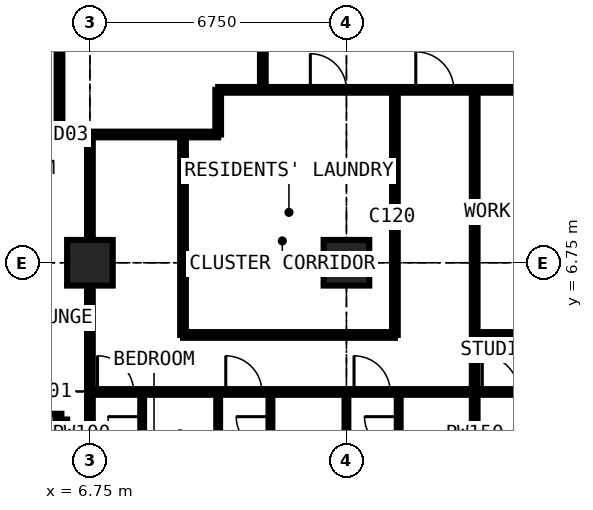
"""IFC4 building model, lengths in metres.
Left out: names, types, materials, properties, quantities, classifications, styles, units other than length and angle.
Written with IfcOpenShell. Run it as: python <this file> out.ifc"""

import sys

from ifc_helpers import new_model, si_unit, direction, frame, frame_2d, origin, origin_2d, place, context, subcontext, project, spatial, rectangle, extrude, element, fill, save


model = new_model("IFC4")
c1 = context("Model", 3, precision=1e-05, world=origin(), true_north=direction((0.0, 1.0)))
c2 = subcontext(c1, "Body", "Model", "MODEL_VIEW")
j1 = project(units=[si_unit("LENGTHUNIT", "METRE"), si_unit("PLANEANGLEUNIT", "RADIAN")], contexts=[c1])
p1 = place(None, origin())
s1 = spatial("IfcSite", under=j1, at=p1, CompositionType="ELEMENT")
p2 = place(p1, origin())
s2 = spatial("IfcBuilding", under=s1, at=p2, CompositionType="ELEMENT")
p3 = place(p2, frame((0.0, 0.0, 178.2)))
s3 = spatial("IfcBuildingStorey", under=s2, at=p3, CompositionType="ELEMENT", Elevation=178.2)
for number, where, z_axis, x_axis in (
    (1, (6.75, 6.75, 0.0), (0.0, 0.0, 1.0), (1.0, 0.0, 0.0)),
    (2, (13.5, 6.75, 0.0), (0.0, 0.0, 1.0), (1.0, 0.0, 0.0)),
):
    element("IfcColumn", number, at=place(p3, frame(where, z_axis=z_axis, x_axis=x_axis)), inside=s3, PredefinedType="COLUMN", context=c2, shape_type="SweptSolid", body=[
        extrude(rectangle(XDim=1.2, YDim=1.2, at=origin_2d()), origin(), (0.0, 0.0, 1.0), 3.6),
    ])
p4 = place(p3, frame((2.625, 2.625, 0.0), z_axis=(0.0, 0.0, 1.0), x_axis=(1.0, 0.0, 0.0)))
e3 = element("IfcWall", 3, at=p4, inside=s3, PredefinedType="SOLIDWALL", context=c2, shape_type="SweptSolid", body=[
    extrude(rectangle(XDim=3.375, YDim=0.3, at=frame_2d((1.688, 0.0))), origin(), (0.0, 0.0, 1.0), 3.375),
])
p5 = place(p4, frame((0.788, 0.0, 0.6)))
e4 = element("IfcOpeningElement", 4, at=p5, cuts=e3, PredefinedType="OPENING", context=c2, shape_type="SweptSolid", body=[
    extrude(rectangle(XDim=1.8, YDim=2.1, at=frame_2d((0.9, 1.05))), frame((0.0, 0.16, 0.0), z_axis=(0.0, -1.0, 0.0), x_axis=(1.0, 0.0, 0.0)), (0.0, 0.0, 1.0), 0.32),
])
p6 = place(p3, frame((6.0, 2.625, 0.0), z_axis=(0.0, 0.0, 1.0), x_axis=(0.0, -1.0, 0.0)))
e5 = element("IfcWall", 5, at=p6, inside=s3, PredefinedType="SOLIDWALL", context=c2, shape_type="SweptSolid", body=[
    extrude(rectangle(XDim=3.375, YDim=0.3, at=frame_2d((1.688, 0.0))), origin(), (0.0, 0.0, 1.0), 3.375),
])
p7 = place(p6, frame((0.788, 0.0, 0.6)))
e6 = element("IfcOpeningElement", 6, at=p7, cuts=e5, PredefinedType="OPENING", context=c2, shape_type="SweptSolid", body=[
    extrude(rectangle(XDim=1.8, YDim=2.1, at=frame_2d((0.9, 1.05))), frame((0.0, 0.16, 0.0), z_axis=(0.0, -1.0, 0.0), x_axis=(1.0, 0.0, 0.0)), (0.0, 0.0, 1.0), 0.32),
])
p8 = place(p3, frame((-0.734, 10.125, 0.0), z_axis=(0.0, 0.0, 1.0), x_axis=(1.0, 0.0, 0.0)))
e7 = element("IfcWall", 7, at=p8, inside=s3, PredefinedType="PARTITIONING", context=c2, shape_type="SweptSolid", body=[
    extrude(rectangle(XDim=10.859, YDim=0.15, at=frame_2d((5.429, 0.0))), origin(), (0.0, 0.0, 1.0), 3.375),
])
p9 = place(p8, frame((4.884, 0.0, 0.0)))
e8 = element("IfcOpeningElement", 8, at=p9, cuts=e7, PredefinedType="OPENING", context=c2, shape_type="SweptSolid", body=[
    extrude(rectangle(XDim=1.0, YDim=2.2, at=frame_2d((0.5, 1.1))), frame((0.0, 0.085, 0.0), z_axis=(0.0, -1.0, 0.0), x_axis=(1.0, 0.0, 0.0)), (0.0, 0.0, 1.0), 0.17),
])
p10 = place(p3, frame((5.95, 10.125, 0.0), z_axis=(0.0, 0.0, 1.0), x_axis=(0.0, 1.0, 0.0)))
e9 = element("IfcWall", 9, at=p10, inside=s3, PredefinedType="PARTITIONING", context=c2, shape_type="SweptSolid", body=[
    extrude(rectangle(XDim=2.65, YDim=0.15, at=frame_2d((1.325, 0.0))), origin(), (0.0, 0.0, 1.0), 3.375),
])
p11 = place(p3, frame((6.75, -0.734, 0.0), z_axis=(0.0, 0.0, 1.0), x_axis=(0.0, 1.0, 0.0)))
e10 = element("IfcWall", 10, at=p11, inside=s3, PredefinedType="PARTITIONING", context=c2, shape_type="SweptSolid", body=[
    extrude(rectangle(XDim=10.859, YDim=0.15, at=frame_2d((5.429, 0.0))), origin(), (0.0, 0.0, 1.0), 2.877),
])
p12 = place(p3, frame((6.75, 3.35, 0.0), z_axis=(0.0, 0.0, 1.0), x_axis=(1.0, 0.0, 0.0)))
e11 = element("IfcWall", 11, at=p12, inside=s3, PredefinedType="PARTITIONING", context=c2, shape_type="SweptSolid", body=[
    extrude(rectangle(XDim=20.25, YDim=0.15, at=frame_2d((10.125, 0.0))), origin(), (0.0, 0.0, 1.0), 3.375),
])
p13 = place(p12, frame((0.2, 0.0, 0.0)))
e12 = element("IfcOpeningElement", 12, at=p13, cuts=e11, PredefinedType="OPENING", context=c2, shape_type="SweptSolid", body=[
    extrude(rectangle(XDim=0.95, YDim=2.2, at=frame_2d((0.475, 1.1))), frame((0.0, 0.085, 0.0), z_axis=(0.0, -1.0, 0.0), x_axis=(1.0, 0.0, 0.0)), (0.0, 0.0, 1.0), 0.17),
])
p14 = place(p12, frame((3.575, 0.0, 0.0)))
e13 = element("IfcOpeningElement", 13, at=p14, cuts=e11, PredefinedType="OPENING", context=c2, shape_type="SweptSolid", body=[
    extrude(rectangle(XDim=0.95, YDim=2.2, at=frame_2d((0.475, 1.1))), frame((0.0, 0.085, 0.0), z_axis=(0.0, -1.0, 0.0), x_axis=(1.0, 0.0, 0.0)), (0.0, 0.0, 1.0), 0.17),
])
p15 = place(p12, frame((6.95, 0.0, 0.0)))
e14 = element("IfcOpeningElement", 14, at=p15, cuts=e11, PredefinedType="OPENING", context=c2, shape_type="SweptSolid", body=[
    extrude(rectangle(XDim=0.95, YDim=2.2, at=frame_2d((0.475, 1.1))), frame((0.0, 0.085, 0.0), z_axis=(0.0, -1.0, 0.0), x_axis=(1.0, 0.0, 0.0)), (0.0, 0.0, 1.0), 0.17),
])
p16 = place(p12, frame((15.1, 0.0, 0.0)))
e15 = element("IfcOpeningElement", 15, at=p16, cuts=e11, PredefinedType="OPENING", context=c2, shape_type="SweptSolid", body=[
    extrude(rectangle(XDim=0.95, YDim=2.2, at=frame_2d((0.475, 1.1))), frame((0.0, 0.085, 0.0), z_axis=(0.0, -1.0, 0.0), x_axis=(1.0, 0.0, 0.0)), (0.0, 0.0, 1.0), 0.17),
])
p17 = place(p12, frame((10.325, 0.0, 0.0)))
e16 = element("IfcOpeningElement", 16, at=p17, cuts=e11, PredefinedType="OPENING", context=c2, shape_type="SweptSolid", body=[
    extrude(rectangle(XDim=0.95, YDim=2.2, at=frame_2d((0.475, 1.1))), frame((0.0, 0.085, 0.0), z_axis=(0.0, -1.0, 0.0), x_axis=(1.0, 0.0, 0.0)), (0.0, 0.0, 1.0), 0.17),
])
p18 = place(p3, frame((8.125, 1.15, 0.0), z_axis=(0.0, 0.0, 1.0), x_axis=(0.0, 1.0, 0.0)))
e17 = element("IfcWall", 17, at=p18, inside=s3, PredefinedType="PARTITIONING", context=c2, shape_type="SweptSolid", body=[
    extrude(rectangle(XDim=2.2, YDim=0.1, at=frame_2d((1.1, 0.0))), origin(), (0.0, 0.0, 1.0), 3.375),
])
p19 = place(p18, frame((0.65, 0.0, 0.0)))
e18 = element("IfcOpeningElement", 18, at=p19, cuts=e17, PredefinedType="OPENING", context=c2, shape_type="SweptSolid", body=[
    extrude(rectangle(XDim=0.9, YDim=2.2, at=frame_2d((0.45, 1.1))), frame((0.0, 0.06, 0.0), z_axis=(0.0, -1.0, 0.0), x_axis=(1.0, 0.0, 0.0)), (0.0, 0.0, 1.0), 0.12),
])
p20 = place(p3, frame((9.2, 4.85, 0.0), z_axis=(0.0, 0.0, 1.0), x_axis=(0.0, 1.0, 0.0)))
e19 = element("IfcWall", 19, at=p20, inside=s3, PredefinedType="PARTITIONING", context=c2, shape_type="SweptSolid", body=[
    extrude(rectangle(XDim=5.275, YDim=0.15, at=frame_2d((2.637, 0.0))), origin(), (0.0, 0.0, 1.0), 3.375),
])
p21 = place(p3, frame((9.2, 4.85, 0.0), z_axis=(0.0, 0.0, 1.0), x_axis=(1.0, 0.0, 0.0)))
e20 = element("IfcWall", 20, at=p21, inside=s3, PredefinedType="PARTITIONING", context=c2, shape_type="SweptSolid", body=[
    extrude(rectangle(XDim=5.575, YDim=0.15, at=frame_2d((2.788, 0.0))), origin(), (0.0, 0.0, 1.0), 3.375),
])
p22 = place(p3, frame((10.125, -0.734, 0.0), z_axis=(0.0, 0.0, 1.0), x_axis=(0.0, 1.0, 0.0)))
e21 = element("IfcWall", 21, at=p22, inside=s3, PredefinedType="PARTITIONING", context=c2, shape_type="SweptSolid", body=[
    extrude(rectangle(XDim=4.084, YDim=0.1, at=frame_2d((2.042, 0.0))), origin(), (0.0, 0.0, 1.0), 3.375),
])
p23 = place(p3, frame((10.125, 10.125, 0.0), z_axis=(0.0, 0.0, 1.0), x_axis=(0.0, 1.0, 0.0)))
e22 = element("IfcWall", 22, at=p23, inside=s3, PredefinedType="PARTITIONING", context=c2, shape_type="SweptSolid", body=[
    extrude(rectangle(XDim=1.175, YDim=0.15, at=frame_2d((0.587, 0.0))), origin(), (0.0, 0.0, 1.0), 3.375),
])
p24 = place(p3, frame((10.125, 11.3, 0.0), z_axis=(0.0, 0.0, 1.0), x_axis=(1.0, 0.0, 0.0)))
e23 = element("IfcWall", 23, at=p24, inside=s3, PredefinedType="PARTITIONING", context=c2, shape_type="SweptSolid", body=[
    extrude(rectangle(XDim=20.25, YDim=0.15, at=frame_2d((10.125, 0.0))), origin(), (0.0, 0.0, 1.0), 3.375),
])
p25 = place(p24, frame((5.2, 0.0, 0.0)))
e24 = element("IfcOpeningElement", 24, at=p25, cuts=e23, PredefinedType="OPENING", context=c2, shape_type="SweptSolid", body=[
    extrude(rectangle(XDim=1.0, YDim=2.2, at=frame_2d((0.5, 1.1))), frame((0.0, 0.085, 0.0), z_axis=(0.0, -1.0, 0.0), x_axis=(1.0, 0.0, 0.0)), (0.0, 0.0, 1.0), 0.17),
])
p26 = place(p24, frame((11.312, 0.0, 0.0)))
e25 = element("IfcOpeningElement", 25, at=p26, cuts=e23, PredefinedType="OPENING", context=c2, shape_type="SweptSolid", body=[
    extrude(rectangle(XDim=1.0, YDim=2.2, at=frame_2d((0.5, 1.1))), frame((0.0, 0.085, 0.0), z_axis=(0.0, -1.0, 0.0), x_axis=(1.0, 0.0, 0.0)), (0.0, 0.0, 1.0), 0.17),
])
p27 = place(p24, frame((2.425, 0.0, 0.0)))
e26 = element("IfcOpeningElement", 26, at=p27, cuts=e23, PredefinedType="OPENING", context=c2, shape_type="SweptSolid", body=[
    extrude(rectangle(XDim=0.95, YDim=2.2, at=frame_2d((0.475, 1.1))), frame((0.0, 0.085, 0.0), z_axis=(0.0, -1.0, 0.0), x_axis=(1.0, 0.0, 0.0)), (0.0, 0.0, 1.0), 0.17),
])
p28 = place(p3, frame((11.3, 11.3, 0.0), z_axis=(0.0, 0.0, 1.0), x_axis=(0.0, 1.0, 0.0)))
e27 = element("IfcWall", 27, at=p28, inside=s3, PredefinedType="PARTITIONING", context=c2, shape_type="SweptSolid", body=[
    extrude(rectangle(XDim=19.3, YDim=0.15, at=frame_2d((9.65, 0.0))), origin(), (0.0, 0.0, 1.0), 3.375),
])
p29 = place(p28, frame((13.525, 0.0, 0.0)))
e28 = element("IfcOpeningElement", 28, at=p29, cuts=e27, PredefinedType="OPENING", context=c2, shape_type="SweptSolid", body=[
    extrude(rectangle(XDim=1.0, YDim=2.2, at=frame_2d((0.5, 1.1))), frame((0.0, 0.085, 0.0), z_axis=(0.0, -1.0, 0.0), x_axis=(1.0, 0.0, 0.0)), (0.0, 0.0, 1.0), 0.17),
])
p30 = place(p28, frame((10.438, 0.0, 0.0)))
e29 = element("IfcOpeningElement", 29, at=p30, cuts=e27, PredefinedType="OPENING", context=c2, shape_type="SweptSolid", body=[
    extrude(rectangle(XDim=1.0, YDim=2.2, at=frame_2d((0.5, 1.1))), frame((0.0, 0.085, 0.0), z_axis=(0.0, -1.0, 0.0), x_axis=(1.0, 0.0, 0.0)), (0.0, 0.0, 1.0), 0.17),
])
p31 = place(p3, frame((11.5, 1.15, 0.0), z_axis=(0.0, 0.0, 1.0), x_axis=(0.0, 1.0, 0.0)))
e30 = element("IfcWall", 30, at=p31, inside=s3, PredefinedType="PARTITIONING", context=c2, shape_type="SweptSolid", body=[
    extrude(rectangle(XDim=2.2, YDim=0.1, at=frame_2d((1.1, 0.0))), origin(), (0.0, 0.0, 1.0), 3.375),
])
p32 = place(p31, frame((0.65, 0.0, 0.0)))
e31 = element("IfcOpeningElement", 31, at=p32, cuts=e30, PredefinedType="OPENING", context=c2, shape_type="SweptSolid", body=[
    extrude(rectangle(XDim=0.9, YDim=2.2, at=frame_2d((0.45, 1.1))), frame((0.0, 0.06, 0.0), z_axis=(0.0, -1.0, 0.0), x_axis=(1.0, 0.0, 0.0)), (0.0, 0.0, 1.0), 0.12),
])
p33 = place(p3, frame((13.5, -0.734, 0.0), z_axis=(0.0, 0.0, 1.0), x_axis=(0.0, 1.0, 0.0)))
e32 = element("IfcWall", 32, at=p33, inside=s3, PredefinedType="PARTITIONING", context=c2, shape_type="SweptSolid", body=[
    extrude(rectangle(XDim=4.084, YDim=0.1, at=frame_2d((2.042, 0.0))), origin(), (0.0, 0.0, 1.0), 2.877),
])
p34 = place(p3, frame((14.775, 4.85, 0.0), z_axis=(0.0, 0.0, 1.0), x_axis=(0.0, 1.0, 0.0)))
e33 = element("IfcWall", 33, at=p34, inside=s3, PredefinedType="PARTITIONING", context=c2, shape_type="SweptSolid", body=[
    extrude(rectangle(XDim=6.45, YDim=0.15, at=frame_2d((3.225, 0.0))), origin(), (0.0, 0.0, 1.0), 3.375),
])
p35 = place(p3, frame((14.875, 1.15, 0.0), z_axis=(0.0, 0.0, 1.0), x_axis=(0.0, 1.0, 0.0)))
e34 = element("IfcWall", 34, at=p35, inside=s3, PredefinedType="PARTITIONING", context=c2, shape_type="SweptSolid", body=[
    extrude(rectangle(XDim=2.2, YDim=0.1, at=frame_2d((1.1, 0.0))), origin(), (0.0, 0.0, 1.0), 3.375),
])
p36 = place(p35, frame((0.65, 0.0, 0.0)))
e35 = element("IfcOpeningElement", 35, at=p36, cuts=e34, PredefinedType="OPENING", context=c2, shape_type="SweptSolid", body=[
    extrude(rectangle(XDim=0.9, YDim=2.2, at=frame_2d((0.45, 1.1))), frame((0.0, 0.06, 0.0), z_axis=(0.0, -1.0, 0.0), x_axis=(1.0, 0.0, 0.0)), (0.0, 0.0, 1.0), 0.12),
])
p37 = place(p3, frame((16.875, -0.734, 0.0), z_axis=(0.0, 0.0, 1.0), x_axis=(0.0, 1.0, 0.0)))
e36 = element("IfcWall", 36, at=p37, inside=s3, PredefinedType="PARTITIONING", context=c2, shape_type="SweptSolid", body=[
    extrude(rectangle(XDim=12.034, YDim=0.15, at=frame_2d((6.017, 0.0))), origin(), (0.0, 0.0, 1.0), 3.375),
])
p38 = place(p3, frame((16.875, 4.85, 0.0), z_axis=(0.0, 0.0, 1.0), x_axis=(1.0, 0.0, 0.0)))
e37 = element("IfcWall", 37, at=p38, inside=s3, PredefinedType="PARTITIONING", context=c2, shape_type="SweptSolid", body=[
    extrude(rectangle(XDim=4.012, YDim=0.15, at=frame_2d((2.006, 0.0))), origin(), (0.0, 0.0, 1.0), 3.375),
])
p39 = place(p13, origin())
e38 = element("IfcDoor", 38, at=p39, inside=s3, OperationType="SINGLE_SWING_LEFT", PredefinedType="DOOR", context=c2, shape_type="SweptSolid", body=[
    extrude(rectangle(XDim=0.95, YDim=2.2, at=frame_2d((0.475, 1.1))), frame((0.0, 0.025, 0.0), z_axis=(0.0, -1.0, 0.0), x_axis=(1.0, 0.0, 0.0)), (0.0, 0.0, 1.0), 0.05),
])
fill(e12, e38)
p40 = place(p19, origin())
e39 = element("IfcDoor", 39, at=p40, inside=s3, OperationType="SINGLE_SWING_RIGHT", PredefinedType="DOOR", context=c2, shape_type="SweptSolid", body=[
    extrude(rectangle(XDim=0.9, YDim=2.2, at=frame_2d((0.45, 1.1))), frame((0.0, 0.025, 0.0), z_axis=(0.0, -1.0, 0.0), x_axis=(1.0, 0.0, 0.0)), (0.0, 0.0, 1.0), 0.05),
])
fill(e18, e39)
p41 = place(p14, origin())
e40 = element("IfcDoor", 40, at=p41, inside=s3, OperationType="SINGLE_SWING_LEFT", PredefinedType="DOOR", context=c2, shape_type="SweptSolid", body=[
    extrude(rectangle(XDim=0.95, YDim=2.2, at=frame_2d((0.475, 1.1))), frame((0.0, 0.025, 0.0), z_axis=(0.0, -1.0, 0.0), x_axis=(1.0, 0.0, 0.0)), (0.0, 0.0, 1.0), 0.05),
])
fill(e13, e40)
p42 = place(p32, origin())
e41 = element("IfcDoor", 41, at=p42, inside=s3, OperationType="SINGLE_SWING_RIGHT", PredefinedType="DOOR", context=c2, shape_type="SweptSolid", body=[
    extrude(rectangle(XDim=0.9, YDim=2.2, at=frame_2d((0.45, 1.1))), frame((0.0, 0.025, 0.0), z_axis=(0.0, -1.0, 0.0), x_axis=(1.0, 0.0, 0.0)), (0.0, 0.0, 1.0), 0.05),
])
fill(e31, e41)
p43 = place(p15, origin())
e42 = element("IfcDoor", 42, at=p43, inside=s3, OperationType="SINGLE_SWING_LEFT", PredefinedType="DOOR", context=c2, shape_type="SweptSolid", body=[
    extrude(rectangle(XDim=0.95, YDim=2.2, at=frame_2d((0.475, 1.1))), frame((0.0, 0.025, 0.0), z_axis=(0.0, -1.0, 0.0), x_axis=(1.0, 0.0, 0.0)), (0.0, 0.0, 1.0), 0.05),
])
fill(e14, e42)
p44 = place(p36, origin())
e43 = element("IfcDoor", 43, at=p44, inside=s3, OperationType="SINGLE_SWING_RIGHT", PredefinedType="DOOR", context=c2, shape_type="SweptSolid", body=[
    extrude(rectangle(XDim=0.9, YDim=2.2, at=frame_2d((0.45, 1.1))), frame((0.0, 0.025, 0.0), z_axis=(0.0, -1.0, 0.0), x_axis=(1.0, 0.0, 0.0)), (0.0, 0.0, 1.0), 0.05),
])
fill(e35, e43)
p45 = place(p25, origin())
e44 = element("IfcDoor", 44, at=p45, inside=s3, OperationType="SINGLE_SWING_LEFT", PredefinedType="DOOR", context=c2, shape_type="SweptSolid", body=[
    extrude(rectangle(XDim=1.0, YDim=2.2, at=frame_2d((0.5, 1.1))), frame((0.0, 0.025, 0.0), z_axis=(0.0, -1.0, 0.0), x_axis=(1.0, 0.0, 0.0)), (0.0, 0.0, 1.0), 0.05),
])
fill(e24, e44)
p46 = place(p17, origin())
e45 = element("IfcDoor", 45, at=p46, inside=s3, OperationType="SINGLE_SWING_LEFT", PredefinedType="DOOR", context=c2, shape_type="SweptSolid", body=[
    extrude(rectangle(XDim=0.95, YDim=2.2, at=frame_2d((0.475, 1.1))), frame((0.0, 0.025, 0.0), z_axis=(0.0, -1.0, 0.0), x_axis=(1.0, 0.0, 0.0)), (0.0, 0.0, 1.0), 0.05),
])
fill(e16, e45)
p47 = place(p27, origin())
e46 = element("IfcDoor", 46, at=p47, inside=s3, OperationType="SINGLE_SWING_LEFT", PredefinedType="DOOR", context=c2, shape_type="SweptSolid", body=[
    extrude(rectangle(XDim=0.95, YDim=2.2, at=frame_2d((0.475, 1.1))), frame((0.0, 0.025, 0.0), z_axis=(0.0, -1.0, 0.0), x_axis=(1.0, 0.0, 0.0)), (0.0, 0.0, 1.0), 0.05),
])
fill(e26, e46)
save(model, sys.argv[1])
